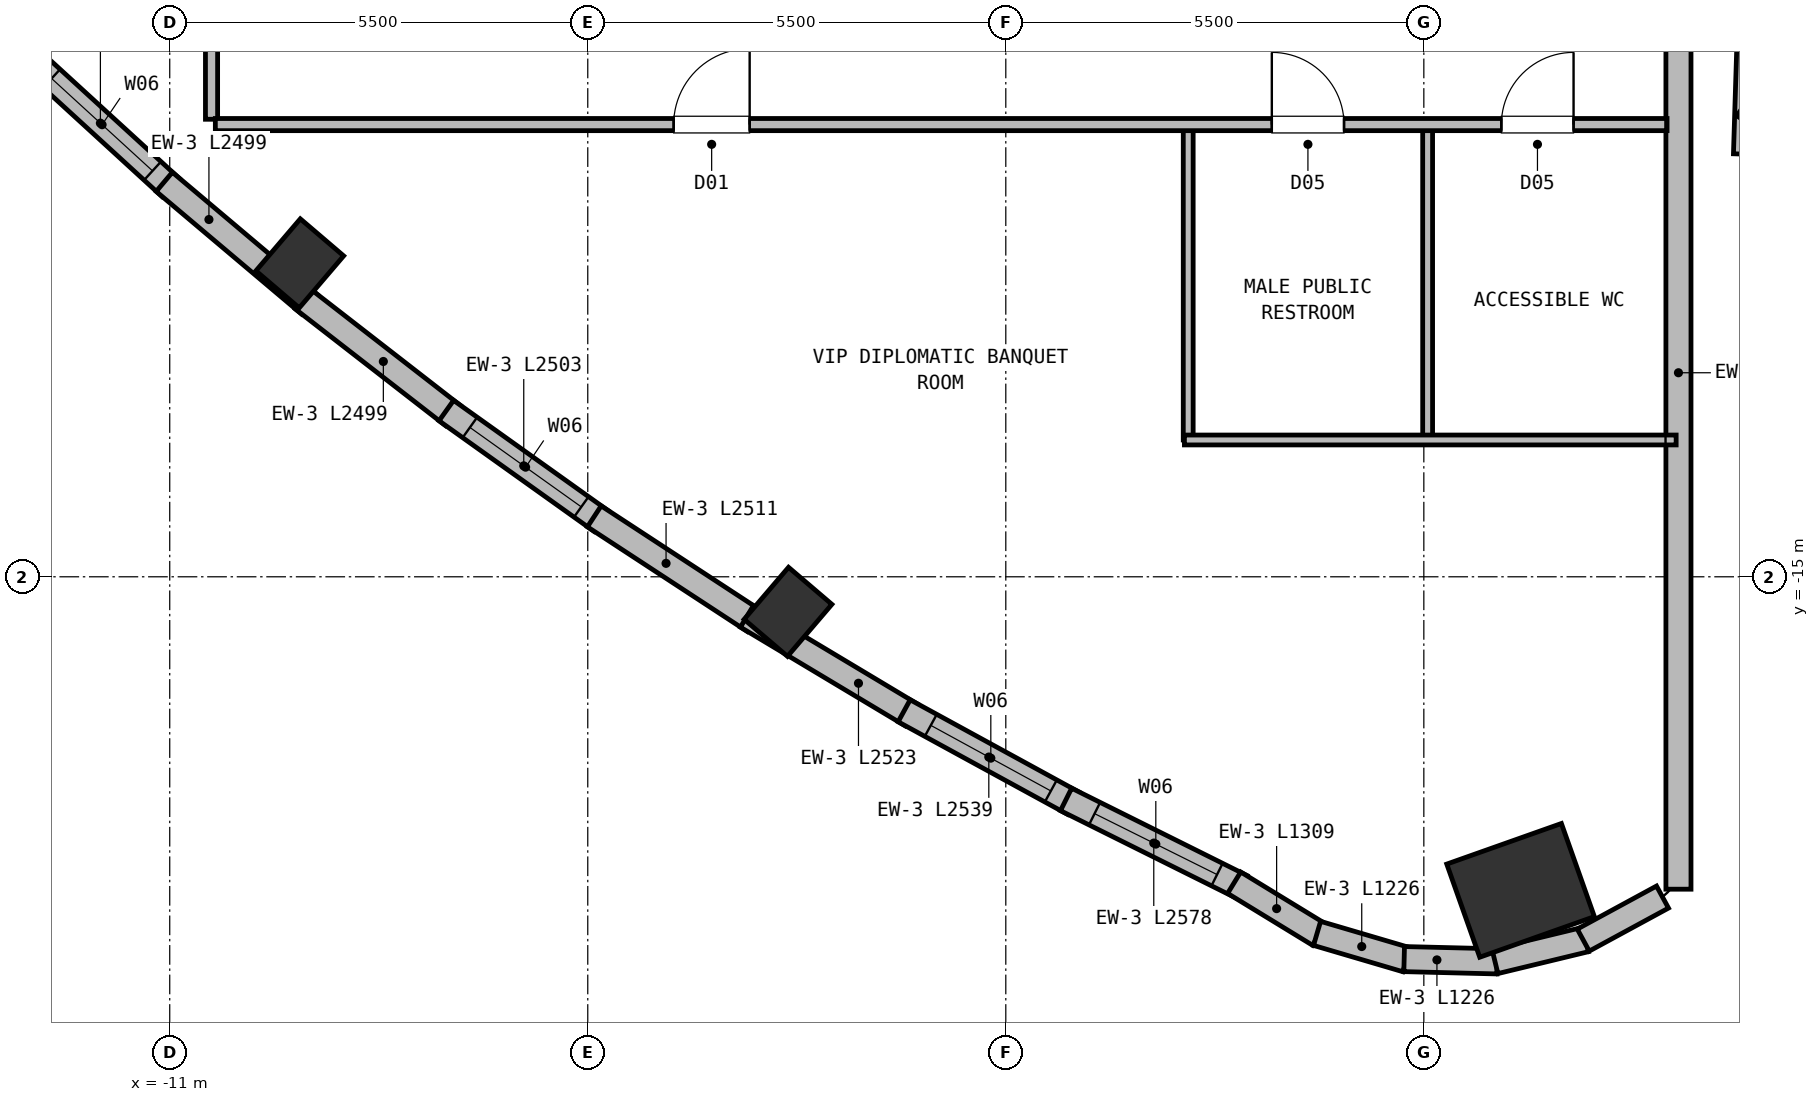
"""IFC4 building model, lengths in metres.
Left out: names, types, materials, properties, quantities, classifications, styles, units other than length and angle.
Written with IfcOpenShell. Run it as: python <this file> out.ifc"""

import sys

from ifc_helpers import new_model, si_unit, direction, frame, frame_2d, origin, origin_2d, place, context, subcontext, project, spatial, rectangle, extrude, element, fill, save


model = new_model("IFC4")
c1 = context("Model", 3, precision=1e-05, world=origin(), true_north=direction((0.0, 1.0)))
c2 = subcontext(c1, "Body", "Model", "MODEL_VIEW")
j1 = project(units=[si_unit("LENGTHUNIT", "METRE"), si_unit("PLANEANGLEUNIT", "RADIAN")], contexts=[c1])
p1 = place(None, origin())
s1 = spatial("IfcSite", under=j1, at=p1, CompositionType="ELEMENT")
p2 = place(p1, origin())
s2 = spatial("IfcBuilding", under=s1, at=p2, CompositionType="ELEMENT")
p3 = place(p2, frame((0.0, 0.0, 299.2)))
s3 = spatial("IfcBuildingStorey", under=s2, at=p3, CompositionType="ELEMENT", Elevation=299.2)
for number, where, z_axis, x_axis in (
    (1, (-9.289, -10.876, 0.0), (0.0, 0.0, 1.0), (-0.76, 0.649, 0.0)),
    (2, (-2.865, -15.461, 0.0), (0.0, 0.0, 1.0), (-0.76, 0.649, 0.0)),
):
    element("IfcColumn", number, at=place(p3, frame(where, z_axis=z_axis, x_axis=x_axis)), inside=s3, PredefinedType="COLUMN", context=c2, shape_type="SweptSolid", body=[
        extrude(rectangle(XDim=0.75, YDim=0.9, at=origin_2d()), origin(), (0.0, 0.0, 1.0), 4.4),
    ])
p4 = place(p3, frame((6.773, -19.126, 0.0), z_axis=(0.0, 0.0, 1.0), x_axis=(-0.333806859234, 0.942641491092, 0.0)))
e3 = element("IfcColumn", 3, at=p4, inside=s3, PredefinedType="COLUMN", context=c2, shape_type="SweptSolid", body=[
    extrude(rectangle(XDim=1.3, YDim=1.6, at=origin_2d()), origin(), (0.0, 0.0, 1.0), 4.4),
])
p5 = place(p3, frame((8.85, -5.52, 0.0), z_axis=(0.0, 0.0, 1.0), x_axis=(0.0, -1.0, 0.0)))
e4 = element("IfcWall", 4, at=p5, inside=s3, PredefinedType="SOLIDWALL", context=c2, shape_type="SweptSolid", body=[
    extrude(rectangle(XDim=13.591, YDim=0.33, at=frame_2d((6.795, 0.0))), origin(), (0.0, 0.0, 1.0), 4.12),
])
p6 = place(p3, frame((9.739, -9.439, 0.0), z_axis=(0.0, 0.0, 1.0), x_axis=(0.031147484759, 0.999514799387, 0.0)))
e5 = element("IfcWall", 5, at=p6, inside=s3, PredefinedType="SOLIDWALL", context=c2, shape_type="SweptSolid", body=[
    extrude(rectangle(XDim=6.114, YDim=0.33, at=frame_2d((3.057, 0.0))), origin(), (0.0, 0.0, 1.0), 3.65),
])
p7 = place(p3, frame((-10.989, -9.876, 0.0), z_axis=(0.0, 0.0, 1.0), x_axis=(-0.737627628948, 0.675207731748, 0.0)))
e6 = element("IfcWall", 6, at=p7, inside=s3, PredefinedType="SOLIDWALL", context=c2, shape_type="SweptSolid", body=[
    extrude(rectangle(XDim=2.503, YDim=0.33, at=frame_2d((1.251, 0.0))), origin(), (0.0, 0.0, 1.0), 4.12),
])
p8 = place(p7, frame((0.322, 0.0, 0.72)))
e7 = element("IfcOpeningElement", 7, at=p8, cuts=e6, PredefinedType="OPENING", context=c2, shape_type="SweptSolid", body=[
    extrude(rectangle(XDim=1.8, YDim=2.25, at=frame_2d((0.9, 1.125))), frame((0.0, 0.175, 0.0), z_axis=(0.0, -1.0, 0.0), x_axis=(1.0, 0.0, 0.0)), (0.0, 0.0, 1.0), 0.35),
])
p9 = place(p3, frame((-9.161, -11.415, 0.0), z_axis=(0.0, 0.0, 1.0), x_axis=(-0.764315556833, 0.644842406781, 0.0)))
e8 = element("IfcWall", 8, at=p9, inside=s3, PredefinedType="SOLIDWALL", context=c2, shape_type="SweptSolid", body=[
    extrude(rectangle(XDim=2.499, YDim=0.33, at=frame_2d((1.25, 0.0))), origin(), (0.0, 0.0, 1.0), 4.12),
])
p10 = place(p3, frame((-7.273, -12.879, 0.0), z_axis=(0.0, 0.0, 1.0), x_axis=(-0.789841179094, 0.613311431336, 0.0)))
e9 = element("IfcWall", 9, at=p10, inside=s3, PredefinedType="SOLIDWALL", context=c2, shape_type="SweptSolid", body=[
    extrude(rectangle(XDim=2.499, YDim=0.33, at=frame_2d((1.25, 0.0))), origin(), (0.0, 0.0, 1.0), 4.12),
])
p11 = place(p3, frame((-5.323, -14.267, 0.0), z_axis=(0.0, 0.0, 1.0), x_axis=(-0.814029925436, 0.580822933857, 0.0)))
e10 = element("IfcWall", 10, at=p11, inside=s3, PredefinedType="SOLIDWALL", context=c2, shape_type="SweptSolid", body=[
    extrude(rectangle(XDim=2.503, YDim=0.33, at=frame_2d((1.251, 0.0))), origin(), (0.0, 0.0, 1.0), 4.12),
])
p12 = place(p11, frame((0.322, 0.0, 0.72)))
e11 = element("IfcOpeningElement", 11, at=p12, cuts=e10, PredefinedType="OPENING", context=c2, shape_type="SweptSolid", body=[
    extrude(rectangle(XDim=1.8, YDim=2.25, at=frame_2d((0.9, 1.125))), frame((0.0, 0.175, 0.0), z_axis=(0.0, -1.0, 0.0), x_axis=(1.0, 0.0, 0.0)), (0.0, 0.0, 1.0), 0.35),
])
p13 = place(p3, frame((-3.313, -15.58, 0.0), z_axis=(0.0, 0.0, 1.0), x_axis=(-0.836746876737, 0.547589868671, 0.0)))
e12 = element("IfcWall", 12, at=p13, inside=s3, PredefinedType="SOLIDWALL", context=c2, shape_type="SweptSolid", body=[
    extrude(rectangle(XDim=2.511, YDim=0.33, at=frame_2d((1.255, 0.0))), origin(), (0.0, 0.0, 1.0), 4.12),
])
p14 = place(p3, frame((-1.242, -16.818, 0.0), z_axis=(0.0, 0.0, 1.0), x_axis=(-0.857902474262, 0.513812557899, 0.0)))
e13 = element("IfcWall", 13, at=p14, inside=s3, PredefinedType="SOLIDWALL", context=c2, shape_type="SweptSolid", body=[
    extrude(rectangle(XDim=2.523, YDim=0.33, at=frame_2d((1.262, 0.0))), origin(), (0.0, 0.0, 1.0), 4.12),
])
p15 = place(p3, frame((0.89, -17.98, 0.0), z_axis=(0.0, 0.0, 1.0), x_axis=(-0.877542510611, 0.479498844702, 0.0)))
e14 = element("IfcWall", 14, at=p15, inside=s3, PredefinedType="SOLIDWALL", context=c2, shape_type="SweptSolid", body=[
    extrude(rectangle(XDim=2.539, YDim=0.33, at=frame_2d((1.269, 0.0))), origin(), (0.0, 0.0, 1.0), 4.12),
])
p16 = place(p15, frame((0.339, 0.0, 0.72)))
e15 = element("IfcOpeningElement", 15, at=p16, cuts=e14, PredefinedType="OPENING", context=c2, shape_type="SweptSolid", body=[
    extrude(rectangle(XDim=1.8, YDim=2.25, at=frame_2d((0.9, 1.125))), frame((0.0, 0.175, 0.0), z_axis=(0.0, -1.0, 0.0), x_axis=(1.0, 0.0, 0.0)), (0.0, 0.0, 1.0), 0.35),
])
p17 = place(p3, frame((3.101, -19.078, 0.0), z_axis=(0.0, 0.0, 1.0), x_axis=(-0.895277941462, 0.445508033073, 0.0)))
e16 = element("IfcWall", 16, at=p17, inside=s3, PredefinedType="SOLIDWALL", context=c2, shape_type="SweptSolid", body=[
    extrude(rectangle(XDim=2.578, YDim=0.33, at=frame_2d((1.289, 0.0))), origin(), (0.0, 0.0, 1.0), 4.12),
])
p18 = place(p17, frame((0.359, 0.0, 0.72)))
e17 = element("IfcOpeningElement", 17, at=p18, cuts=e16, PredefinedType="OPENING", context=c2, shape_type="SweptSolid", body=[
    extrude(rectangle(XDim=1.8, YDim=2.25, at=frame_2d((0.9, 1.125))), frame((0.0, 0.175, 0.0), z_axis=(0.0, -1.0, 0.0), x_axis=(1.0, 0.0, 0.0)), (0.0, 0.0, 1.0), 0.35),
])
p19 = place(p3, frame((4.122, -19.708, 0.0), z_axis=(0.0, 0.0, 1.0), x_axis=(-0.853318707867, 0.521389665034, 0.0)))
e18 = element("IfcWall", 18, at=p19, inside=s3, PredefinedType="SOLIDWALL", context=c2, shape_type="SweptSolid", body=[
    extrude(rectangle(XDim=1.309, YDim=0.33, at=frame_2d((0.655, 0.0))), origin(), (0.0, 0.0, 1.0), 4.12),
])
for number, where, z_axis, x_axis in (
    (19, (5.271, -20.038, 0.0), (0.0, 0.0, 1.0), (-0.959, 0.283, 0.0)),
    (20, (6.467, -20.061, 0.0), (0.0, 0.0, 1.0), (-1.0, 0.025, 0.0)),
):
    element("IfcWall", number, at=place(p3, frame(where, z_axis=z_axis, x_axis=x_axis)), inside=s3, PredefinedType="SOLIDWALL", context=c2, shape_type="SweptSolid", body=[
        extrude(rectangle(XDim=1.226, YDim=0.33, at=frame_2d((0.613, 0.0))), origin(), (0.0, 0.0, 1.0), 4.12),
    ])
p20 = place(p3, frame((7.627, -19.772, 0.0), z_axis=(0.0, 0.0, 1.0), x_axis=(-0.97199913572, -0.234984425353, 0.0)))
e21 = element("IfcWall", 21, at=p20, inside=s3, PredefinedType="SOLIDWALL", context=c2, shape_type="SweptSolid", body=[
    extrude(rectangle(XDim=1.226, YDim=0.33, at=frame_2d((0.613, 0.0))), origin(), (0.0, 0.0, 1.0), 4.12),
])
p21 = place(p3, frame((8.64, -19.214, 0.0), z_axis=(0.0, 0.0, 1.0), x_axis=(-0.878860825238, -0.477078242914, 0.0)))
e22 = element("IfcWall", 22, at=p21, inside=s3, PredefinedType="SOLIDWALL", context=c2, shape_type="SweptSolid", body=[
    extrude(rectangle(XDim=1.187, YDim=0.33, at=frame_2d((0.593, 0.0))), origin(), (0.0, 0.0, 1.0), 4.12),
])
p22 = place(p3, frame((12.352, -10.593, 0.0), z_axis=(0.0, 0.0, 1.0), x_axis=(-0.82687387766, 0.562387402459, 0.0)))
e23 = element("IfcWall", 23, at=p22, inside=s3, PredefinedType="SOLIDWALL", context=c2, shape_type="SweptSolid", body=[
    extrude(rectangle(XDim=3.193, YDim=0.33, at=frame_2d((1.596, 0.0))), origin(), (0.0, 0.0, 1.0), 3.65),
])
for number, where, z_axis, x_axis in (
    (24, (2.4, -9.0, 0.0), (0.0, 0.0, 1.0), (0.0, -1.0, 0.0)),
    (25, (5.55, -9.0, 0.0), (0.0, 0.0, 1.0), (0.0, -1.0, 0.0)),
):
    element("IfcWall", number, at=place(p3, frame(where, z_axis=z_axis, x_axis=x_axis)), inside=s3, PredefinedType="PARTITIONING", context=c2, shape_type="SweptSolid", body=[
        extrude(rectangle(XDim=4.2, YDim=0.13, at=frame_2d((2.1, 0.0))), origin(), (0.0, 0.0, 1.0), 4.12),
    ])
p23 = place(p3, frame((2.35, -13.2, 0.0), z_axis=(0.0, 0.0, 1.0), x_axis=(1.0, 0.0, 0.0)))
e26 = element("IfcWall", 26, at=p23, inside=s3, PredefinedType="PARTITIONING", context=c2, shape_type="SweptSolid", body=[
    extrude(rectangle(XDim=6.469, YDim=0.13, at=frame_2d((3.235, 0.0))), origin(), (0.0, 0.0, 1.0), 4.12),
])
p24 = place(p3, frame((-10.45, 1.1, 0.0), z_axis=(0.0, 0.0, 1.0), x_axis=(0.0, -1.0, 0.0)))
e27 = element("IfcWall", 27, at=p24, inside=s3, PredefinedType="PARTITIONING", context=c2, shape_type="SweptSolid", body=[
    extrude(rectangle(XDim=10.08, YDim=0.16, at=frame_2d((5.04, 0.0))), origin(), (0.0, 0.0, 1.0), 4.12),
])
p25 = place(p24, frame((6.56, 0.0, 0.0)))
e28 = element("IfcOpeningElement", 28, at=p25, cuts=e27, PredefinedType="OPENING", context=c2, shape_type="SweptSolid", body=[
    extrude(rectangle(XDim=1.0, YDim=2.15, at=frame_2d((0.5, 1.075))), frame((0.0, 0.09, 0.0), z_axis=(0.0, -1.0, 0.0), x_axis=(1.0, 0.0, 0.0)), (0.0, 0.0, 1.0), 0.18),
])
p26 = place(p3, frame((-10.4, -9.05, 0.0), z_axis=(0.0, 0.0, 1.0), x_axis=(1.0, 0.0, 0.0)))
e29 = element("IfcWall", 29, at=p26, inside=s3, PredefinedType="PARTITIONING", context=c2, shape_type="SweptSolid", body=[
    extrude(rectangle(XDim=19.1, YDim=0.16, at=frame_2d((9.55, 0.0))), origin(), (0.0, 0.0, 1.0), 4.12),
])
p27 = place(p26, frame((6.03, 0.0, 0.0)))
e30 = element("IfcOpeningElement", 30, at=p27, cuts=e29, PredefinedType="OPENING", context=c2, shape_type="SweptSolid", body=[
    extrude(rectangle(XDim=1.0, YDim=2.15, at=frame_2d((0.5, 1.075))), frame((0.0, 0.09, 0.0), z_axis=(0.0, -1.0, 0.0), x_axis=(1.0, 0.0, 0.0)), (0.0, 0.0, 1.0), 0.18),
])
p28 = place(p26, frame((13.9, 0.0, 0.0)))
e31 = element("IfcOpeningElement", 31, at=p28, cuts=e29, PredefinedType="OPENING", context=c2, shape_type="SweptSolid", body=[
    extrude(rectangle(XDim=0.95, YDim=2.1, at=frame_2d((0.475, 1.05))), frame((0.0, 0.09, 0.0), z_axis=(0.0, -1.0, 0.0), x_axis=(1.0, 0.0, 0.0)), (0.0, 0.0, 1.0), 0.18),
])
p29 = place(p26, frame((16.92, 0.0, 0.0)))
e32 = element("IfcOpeningElement", 32, at=p29, cuts=e29, PredefinedType="OPENING", context=c2, shape_type="SweptSolid", body=[
    extrude(rectangle(XDim=0.95, YDim=2.1, at=frame_2d((0.475, 1.05))), frame((0.0, 0.09, 0.0), z_axis=(0.0, -1.0, 0.0), x_axis=(1.0, 0.0, 0.0)), (0.0, 0.0, 1.0), 0.18),
])
p30 = place(p8, origin())
e33 = element("IfcWindow", 33, at=p30, inside=s3, PartitioningType="SINGLE_PANEL", PredefinedType="WINDOW", context=c2, shape_type="SweptSolid", body=[
    extrude(rectangle(XDim=1.8, YDim=2.25, at=frame_2d((0.9, 1.125))), frame((0.0, 0.03, 0.0), z_axis=(0.0, -1.0, 0.0), x_axis=(1.0, 0.0, 0.0)), (0.0, 0.0, 1.0), 0.06),
])
fill(e7, e33)
p31 = place(p12, origin())
e34 = element("IfcWindow", 34, at=p31, inside=s3, PartitioningType="SINGLE_PANEL", PredefinedType="WINDOW", context=c2, shape_type="SweptSolid", body=[
    extrude(rectangle(XDim=1.8, YDim=2.25, at=frame_2d((0.9, 1.125))), frame((0.0, 0.03, 0.0), z_axis=(0.0, -1.0, 0.0), x_axis=(1.0, 0.0, 0.0)), (0.0, 0.0, 1.0), 0.06),
])
fill(e11, e34)
p32 = place(p16, origin())
e35 = element("IfcWindow", 35, at=p32, inside=s3, PartitioningType="SINGLE_PANEL", PredefinedType="WINDOW", context=c2, shape_type="SweptSolid", body=[
    extrude(rectangle(XDim=1.8, YDim=2.25, at=frame_2d((0.9, 1.125))), frame((0.0, 0.03, 0.0), z_axis=(0.0, -1.0, 0.0), x_axis=(1.0, 0.0, 0.0)), (0.0, 0.0, 1.0), 0.06),
])
fill(e15, e35)
p33 = place(p18, origin())
e36 = element("IfcWindow", 36, at=p33, inside=s3, PartitioningType="SINGLE_PANEL", PredefinedType="WINDOW", context=c2, shape_type="SweptSolid", body=[
    extrude(rectangle(XDim=1.8, YDim=2.25, at=frame_2d((0.9, 1.125))), frame((0.0, 0.03, 0.0), z_axis=(0.0, -1.0, 0.0), x_axis=(1.0, 0.0, 0.0)), (0.0, 0.0, 1.0), 0.06),
])
fill(e17, e36)
p34 = place(p27, origin())
e37 = element("IfcDoor", 37, at=p34, inside=s3, OperationType="SINGLE_SWING_RIGHT", PredefinedType="DOOR", context=c2, shape_type="SweptSolid", body=[
    extrude(rectangle(XDim=1.0, YDim=2.15, at=frame_2d((0.5, 1.075))), frame((0.0, 0.025, 0.0), z_axis=(0.0, -1.0, 0.0), x_axis=(1.0, 0.0, 0.0)), (0.0, 0.0, 1.0), 0.05),
])
fill(e30, e37)
p35 = place(p28, origin())
e38 = element("IfcDoor", 38, at=p35, inside=s3, OperationType="SINGLE_SWING_LEFT", PredefinedType="DOOR", context=c2, shape_type="SweptSolid", body=[
    extrude(rectangle(XDim=0.95, YDim=2.1, at=frame_2d((0.475, 1.05))), frame((0.0, 0.025, 0.0), z_axis=(0.0, -1.0, 0.0), x_axis=(1.0, 0.0, 0.0)), (0.0, 0.0, 1.0), 0.05),
])
fill(e31, e38)
p36 = place(p29, origin())
e39 = element("IfcDoor", 39, at=p36, inside=s3, OperationType="SINGLE_SWING_RIGHT", PredefinedType="DOOR", context=c2, shape_type="SweptSolid", body=[
    extrude(rectangle(XDim=0.95, YDim=2.1, at=frame_2d((0.475, 1.05))), frame((0.0, 0.025, 0.0), z_axis=(0.0, -1.0, 0.0), x_axis=(1.0, 0.0, 0.0)), (0.0, 0.0, 1.0), 0.05),
])
fill(e32, e39)
save(model, sys.argv[1])
